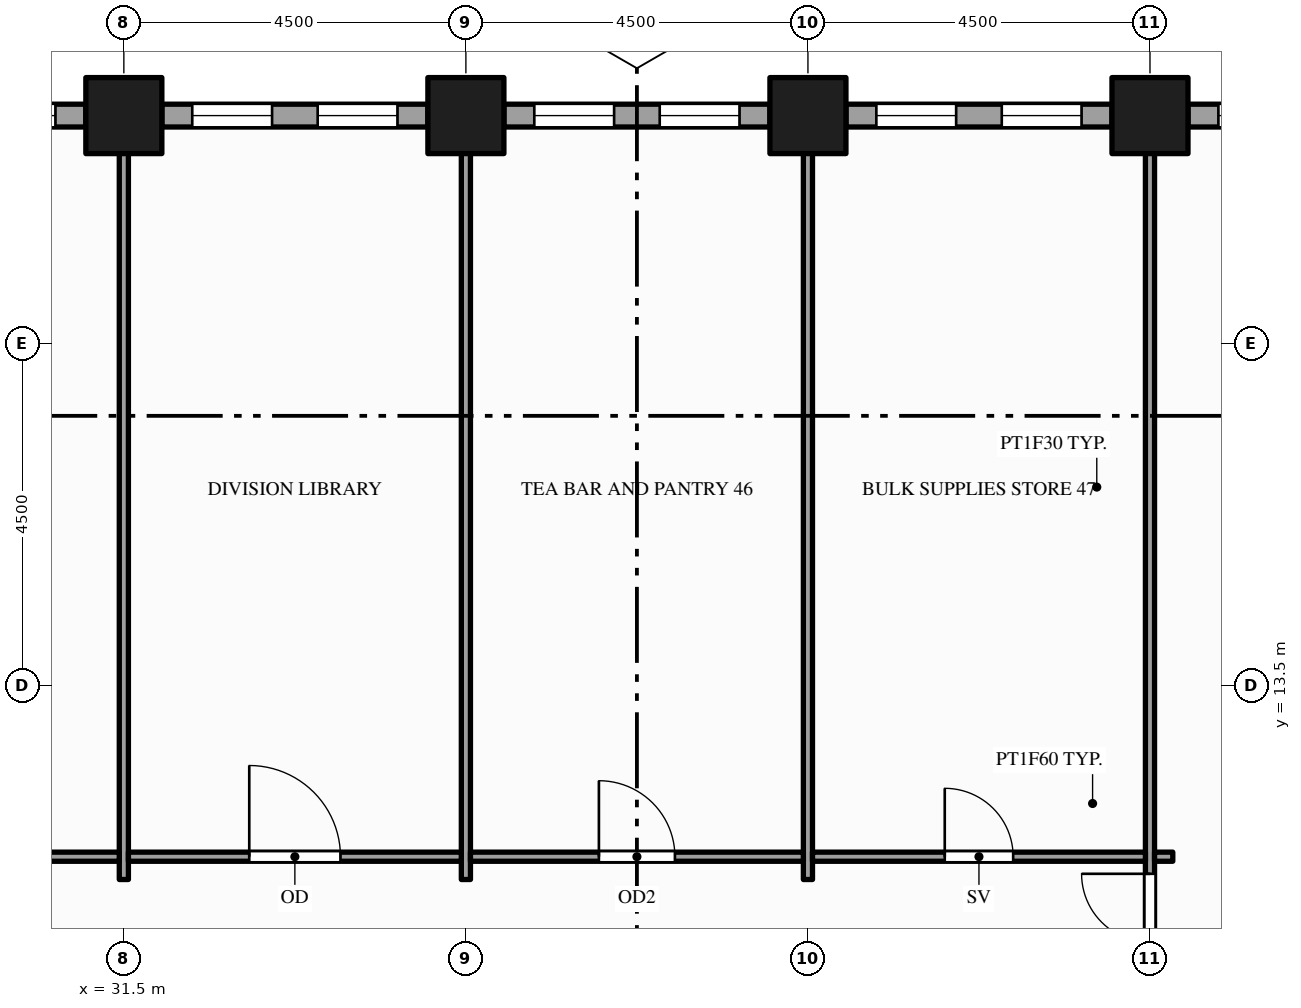
"""IFC4 building model, lengths in metres.
Left out: names, types, materials, properties, quantities, classifications, styles, units other than length and angle.
Written with IfcOpenShell. Run it as: python <this file> out.ifc"""

import sys

from ifc_helpers import new_model, si_unit, direction, frame, frame_2d, origin, origin_2d, place, context, subcontext, project, spatial, rectangle, hollow_rectangle, extrude, element, fill, save


model = new_model("IFC4")
c1 = context("Model", 3, precision=1e-05, world=origin(), true_north=direction((0.0, 1.0)))
c2 = subcontext(c1, "Body", "Model", "MODEL_VIEW")
j1 = project(units=[si_unit("LENGTHUNIT", "METRE"), si_unit("PLANEANGLEUNIT", "RADIAN")], contexts=[c1])
p1 = place(None, origin())
s1 = spatial("IfcSite", under=j1, at=p1, CompositionType="ELEMENT")
p2 = place(p1, origin())
s2 = spatial("IfcBuilding", under=s1, at=p2, CompositionType="ELEMENT")
p3 = place(p2, frame((0.0, 0.0, 119.0)))
s3 = spatial("IfcBuildingStorey", under=s2, at=p3, CompositionType="ELEMENT", Elevation=119.0)
for number, where, z_axis, x_axis in (
    (1, (31.5, 21.0, -0.15), (0.0, 0.0, 1.0), (1.0, 0.0, 0.0)),
    (2, (36.0, 21.0, -0.15), (0.0, 0.0, 1.0), (1.0, 0.0, 0.0)),
    (3, (40.5, 21.0, -0.15), (0.0, 0.0, 1.0), (1.0, 0.0, 0.0)),
    (4, (45.0, 21.0, -0.15), (0.0, 0.0, 1.0), (1.0, 0.0, 0.0)),
):
    element("IfcColumn", number, at=place(p3, frame(where, z_axis=z_axis, x_axis=x_axis)), inside=s3, PredefinedType="COLUMN", context=c2, shape_type="SweptSolid", body=[
        extrude(hollow_rectangle(XDim=1.0, YDim=1.0, WallThickness=0.05, at=origin_2d()), origin(), (0.0, 0.0, 1.0), 4.0),
    ])
p4 = place(p3, frame((49.0, 21.0, 0.0), z_axis=(0.0, 0.0, 1.0), x_axis=(-1.0, 0.0, 0.0)))
e5 = element("IfcWall", 5, at=p4, inside=s3, PredefinedType="STANDARD", context=c2, shape_type="SweptSolid", body=[
    extrude(rectangle(XDim=3.5, YDim=0.3, at=frame_2d((1.75, 0.0))), origin(), (0.0, 0.0, 1.0), 3.154),
])
p5 = place(p4, frame((0.4, 0.0, 0.9)))
e6 = element("IfcOpeningElement", 6, at=p5, cuts=e5, PredefinedType="OPENING", context=c2, shape_type="SweptSolid", body=[
    extrude(rectangle(XDim=1.05, YDim=2.0, at=frame_2d((0.525, 1.0))), frame((0.0, 0.16, 0.0), z_axis=(0.0, -1.0, 0.0), x_axis=(1.0, 0.0, 0.0)), (0.0, 0.0, 1.0), 0.32),
])
p6 = place(p4, frame((2.05, 0.0, 0.9)))
e7 = element("IfcOpeningElement", 7, at=p6, cuts=e5, PredefinedType="OPENING", context=c2, shape_type="SweptSolid", body=[
    extrude(rectangle(XDim=1.05, YDim=2.0, at=frame_2d((0.525, 1.0))), frame((0.0, 0.16, 0.0), z_axis=(0.0, -1.0, 0.0), x_axis=(1.0, 0.0, 0.0)), (0.0, 0.0, 1.0), 0.32),
])
p7 = place(p3, frame((44.5, 21.0, 0.0), z_axis=(0.0, 0.0, 1.0), x_axis=(-1.0, 0.0, 0.0)))
e8 = element("IfcWall", 8, at=p7, inside=s3, PredefinedType="STANDARD", context=c2, shape_type="SweptSolid", body=[
    extrude(rectangle(XDim=3.5, YDim=0.3, at=frame_2d((1.75, 0.0))), origin(), (0.0, 0.0, 1.0), 3.154),
])
p8 = place(p7, frame((0.4, 0.0, 0.9)))
e9 = element("IfcOpeningElement", 9, at=p8, cuts=e8, PredefinedType="OPENING", context=c2, shape_type="SweptSolid", body=[
    extrude(rectangle(XDim=1.05, YDim=2.0, at=frame_2d((0.525, 1.0))), frame((0.0, 0.16, 0.0), z_axis=(0.0, -1.0, 0.0), x_axis=(1.0, 0.0, 0.0)), (0.0, 0.0, 1.0), 0.32),
])
p9 = place(p7, frame((2.05, 0.0, 0.9)))
e10 = element("IfcOpeningElement", 10, at=p9, cuts=e8, PredefinedType="OPENING", context=c2, shape_type="SweptSolid", body=[
    extrude(rectangle(XDim=1.05, YDim=2.0, at=frame_2d((0.525, 1.0))), frame((0.0, 0.16, 0.0), z_axis=(0.0, -1.0, 0.0), x_axis=(1.0, 0.0, 0.0)), (0.0, 0.0, 1.0), 0.32),
])
p10 = place(p3, frame((40.0, 21.0, 0.0), z_axis=(0.0, 0.0, 1.0), x_axis=(-1.0, 0.0, 0.0)))
e11 = element("IfcWall", 11, at=p10, inside=s3, PredefinedType="STANDARD", context=c2, shape_type="SweptSolid", body=[
    extrude(rectangle(XDim=3.5, YDim=0.3, at=frame_2d((1.75, 0.0))), origin(), (0.0, 0.0, 1.0), 3.154),
])
p11 = place(p10, frame((0.4, 0.0, 0.9)))
e12 = element("IfcOpeningElement", 12, at=p11, cuts=e11, PredefinedType="OPENING", context=c2, shape_type="SweptSolid", body=[
    extrude(rectangle(XDim=1.05, YDim=2.0, at=frame_2d((0.525, 1.0))), frame((0.0, 0.16, 0.0), z_axis=(0.0, -1.0, 0.0), x_axis=(1.0, 0.0, 0.0)), (0.0, 0.0, 1.0), 0.32),
])
p12 = place(p10, frame((2.05, 0.0, 0.9)))
e13 = element("IfcOpeningElement", 13, at=p12, cuts=e11, PredefinedType="OPENING", context=c2, shape_type="SweptSolid", body=[
    extrude(rectangle(XDim=1.05, YDim=2.0, at=frame_2d((0.525, 1.0))), frame((0.0, 0.16, 0.0), z_axis=(0.0, -1.0, 0.0), x_axis=(1.0, 0.0, 0.0)), (0.0, 0.0, 1.0), 0.32),
])
p13 = place(p3, frame((35.5, 21.0, 0.0), z_axis=(0.0, 0.0, 1.0), x_axis=(-1.0, 0.0, 0.0)))
e14 = element("IfcWall", 14, at=p13, inside=s3, PredefinedType="STANDARD", context=c2, shape_type="SweptSolid", body=[
    extrude(rectangle(XDim=3.5, YDim=0.3, at=frame_2d((1.75, 0.0))), origin(), (0.0, 0.0, 1.0), 3.154),
])
p14 = place(p13, frame((0.4, 0.0, 0.9)))
e15 = element("IfcOpeningElement", 15, at=p14, cuts=e14, PredefinedType="OPENING", context=c2, shape_type="SweptSolid", body=[
    extrude(rectangle(XDim=1.05, YDim=2.0, at=frame_2d((0.525, 1.0))), frame((0.0, 0.16, 0.0), z_axis=(0.0, -1.0, 0.0), x_axis=(1.0, 0.0, 0.0)), (0.0, 0.0, 1.0), 0.32),
])
p15 = place(p13, frame((2.05, 0.0, 0.9)))
e16 = element("IfcOpeningElement", 16, at=p15, cuts=e14, PredefinedType="OPENING", context=c2, shape_type="SweptSolid", body=[
    extrude(rectangle(XDim=1.05, YDim=2.0, at=frame_2d((0.525, 1.0))), frame((0.0, 0.16, 0.0), z_axis=(0.0, -1.0, 0.0), x_axis=(1.0, 0.0, 0.0)), (0.0, 0.0, 1.0), 0.32),
])
p16 = place(p3, frame((31.0, 21.0, 0.0), z_axis=(0.0, 0.0, 1.0), x_axis=(-1.0, 0.0, 0.0)))
e17 = element("IfcWall", 17, at=p16, inside=s3, PredefinedType="STANDARD", context=c2, shape_type="SweptSolid", body=[
    extrude(rectangle(XDim=2.0, YDim=0.3, at=frame_2d((1.0, 0.0))), origin(), (0.0, 0.0, 1.0), 3.154),
])
p17 = place(p16, frame((0.4, 0.0, 0.9)))
e18 = element("IfcOpeningElement", 18, at=p17, cuts=e17, PredefinedType="OPENING", context=c2, shape_type="SweptSolid", body=[
    extrude(rectangle(XDim=1.2, YDim=2.0, at=frame_2d((0.6, 1.0))), frame((0.0, 0.16, 0.0), z_axis=(0.0, -1.0, 0.0), x_axis=(1.0, 0.0, 0.0)), (0.0, 0.0, 1.0), 0.32),
])
for number, where, z_axis, x_axis in (
    (19, (31.5, 10.95, 0.0), (0.0, 0.0, 1.0), (0.0, 1.0, 0.0)),
    (20, (36.0, 10.95, 0.0), (0.0, 0.0, 1.0), (0.0, 1.0, 0.0)),
    (21, (40.5, 10.95, 0.0), (0.0, 0.0, 1.0), (0.0, 1.0, 0.0)),
):
    element("IfcWall", number, at=place(p3, frame(where, z_axis=z_axis, x_axis=x_axis)), inside=s3, PredefinedType="PARTITIONING", context=c2, shape_type="SweptSolid", body=[
        extrude(rectangle(XDim=9.9, YDim=0.12, at=frame_2d((4.95, 0.0))), origin(), (0.0, 0.0, 1.0), 2.938),
    ])
p18 = place(p3, frame((45.0, -1.35, 0.0), z_axis=(0.0, 0.0, 1.0), x_axis=(0.0, 1.0, 0.0)))
e22 = element("IfcWall", 22, at=p18, inside=s3, PredefinedType="PARTITIONING", context=c2, shape_type="SweptSolid", body=[
    extrude(rectangle(XDim=22.2, YDim=0.12, at=frame_2d((11.1, 0.0))), origin(), (0.0, 0.0, 1.0), 2.938),
])
p19 = place(p18, frame((10.575, 0.0, 0.0)))
e23 = element("IfcOpeningElement", 23, at=p19, cuts=e22, PredefinedType="OPENING", context=c2, shape_type="SweptSolid", body=[
    extrude(rectangle(XDim=1.8, YDim=2.1, at=frame_2d((0.9, 1.05))), frame((0.0, 0.07, 0.0), z_axis=(0.0, -1.0, 0.0), x_axis=(1.0, 0.0, 0.0)), (0.0, 0.0, 1.0), 0.14),
])
p20 = place(p18, frame((0.85, 0.0, 0.0)))
e24 = element("IfcOpeningElement", 24, at=p20, cuts=e22, PredefinedType="OPENING", context=c2, shape_type="SweptSolid", body=[
    extrude(rectangle(XDim=0.9, YDim=2.1, at=frame_2d((0.45, 1.05))), frame((0.0, 0.07, 0.0), z_axis=(0.0, -1.0, 0.0), x_axis=(1.0, 0.0, 0.0)), (0.0, 0.0, 1.0), 0.14),
])
p21 = place(p18, frame((4.65, 0.0, 0.0)))
e25 = element("IfcOpeningElement", 25, at=p21, cuts=e22, PredefinedType="OPENING", context=c2, shape_type="SweptSolid", body=[
    extrude(rectangle(XDim=0.9, YDim=2.1, at=frame_2d((0.45, 1.05))), frame((0.0, 0.07, 0.0), z_axis=(0.0, -1.0, 0.0), x_axis=(1.0, 0.0, 0.0)), (0.0, 0.0, 1.0), 0.14),
])
p22 = place(p18, frame((8.35, 0.0, 0.0)))
e26 = element("IfcOpeningElement", 26, at=p22, cuts=e22, PredefinedType="OPENING", context=c2, shape_type="SweptSolid", body=[
    extrude(rectangle(XDim=1.0, YDim=2.1, at=frame_2d((0.5, 1.05))), frame((0.0, 0.07, 0.0), z_axis=(0.0, -1.0, 0.0), x_axis=(1.0, 0.0, 0.0)), (0.0, 0.0, 1.0), 0.14),
])
p23 = place(p3, frame((15.81, 11.25, 0.0), z_axis=(0.0, 0.0, 1.0), x_axis=(1.0, 0.0, 0.0)))
e27 = element("IfcWall", 27, at=p23, inside=s3, PredefinedType="PARTITIONING", context=c2, shape_type="SweptSolid", body=[
    extrude(rectangle(XDim=15.63, YDim=0.12, at=frame_2d((7.815, 0.0))), origin(), (0.0, 0.0, 1.0), 2.76),
])
p24 = place(p23, frame((3.54, 0.0, 0.0)))
e28 = element("IfcOpeningElement", 28, at=p24, cuts=e27, PredefinedType="OPENING", context=c2, shape_type="SweptSolid", body=[
    extrude(rectangle(XDim=1.8, YDim=2.1, at=frame_2d((0.9, 1.05))), frame((0.0, 0.07, 0.0), z_axis=(0.0, -1.0, 0.0), x_axis=(1.0, 0.0, 0.0)), (0.0, 0.0, 1.0), 0.14),
])
p25 = place(p3, frame((31.56, 11.25, 0.0), z_axis=(0.0, 0.0, 1.0), x_axis=(1.0, 0.0, 0.0)))
e29 = element("IfcWall", 29, at=p25, inside=s3, PredefinedType="PARTITIONING", context=c2, shape_type="SweptSolid", body=[
    extrude(rectangle(XDim=4.38, YDim=0.12, at=frame_2d((2.19, 0.0))), origin(), (0.0, 0.0, 1.0), 2.938),
])
p26 = place(p25, frame((1.59, 0.0, 0.0)))
e30 = element("IfcOpeningElement", 30, at=p26, cuts=e29, PredefinedType="OPENING", context=c2, shape_type="SweptSolid", body=[
    extrude(rectangle(XDim=1.2, YDim=2.1, at=frame_2d((0.6, 1.05))), frame((0.0, 0.07, 0.0), z_axis=(0.0, -1.0, 0.0), x_axis=(1.0, 0.0, 0.0)), (0.0, 0.0, 1.0), 0.14),
])
p27 = place(p3, frame((36.06, 11.25, 0.0), z_axis=(0.0, 0.0, 1.0), x_axis=(1.0, 0.0, 0.0)))
e31 = element("IfcWall", 31, at=p27, inside=s3, PredefinedType="PARTITIONING", context=c2, shape_type="SweptSolid", body=[
    extrude(rectangle(XDim=4.38, YDim=0.12, at=frame_2d((2.19, 0.0))), origin(), (0.0, 0.0, 1.0), 2.938),
])
p28 = place(p27, frame((1.69, 0.0, 0.0)))
e32 = element("IfcOpeningElement", 32, at=p28, cuts=e31, PredefinedType="OPENING", context=c2, shape_type="SweptSolid", body=[
    extrude(rectangle(XDim=1.0, YDim=2.1, at=frame_2d((0.5, 1.05))), frame((0.0, 0.07, 0.0), z_axis=(0.0, -1.0, 0.0), x_axis=(1.0, 0.0, 0.0)), (0.0, 0.0, 1.0), 0.14),
])
p29 = place(p3, frame((40.56, 11.25, 0.0), z_axis=(0.0, 0.0, 1.0), x_axis=(1.0, 0.0, 0.0)))
e33 = element("IfcWall", 33, at=p29, inside=s3, PredefinedType="PARTITIONING", context=c2, shape_type="SweptSolid", body=[
    extrude(rectangle(XDim=4.38, YDim=0.12, at=frame_2d((2.19, 0.0))), origin(), (0.0, 0.0, 1.0), 2.938),
])
p30 = place(p29, frame((1.74, 0.0, 0.0)))
e34 = element("IfcOpeningElement", 34, at=p30, cuts=e33, PredefinedType="OPENING", context=c2, shape_type="SweptSolid", body=[
    extrude(rectangle(XDim=0.9, YDim=2.1, at=frame_2d((0.45, 1.05))), frame((0.0, 0.07, 0.0), z_axis=(0.0, -1.0, 0.0), x_axis=(1.0, 0.0, 0.0)), (0.0, 0.0, 1.0), 0.14),
])
p31 = place(p3, frame((45.06, 11.25, 0.0), z_axis=(0.0, 0.0, 1.0), x_axis=(1.0, 0.0, 0.0)))
e35 = element("IfcWall", 35, at=p31, inside=s3, PredefinedType="PARTITIONING", context=c2, shape_type="SweptSolid", body=[
    extrude(rectangle(XDim=0.24, YDim=0.12, at=frame_2d((0.12, 0.0))), origin(), (0.0, 0.0, 1.0), 2.938),
])
p32 = place(p6, origin())
e36 = element("IfcWindow", 36, at=p32, inside=s3, PartitioningType="SINGLE_PANEL", PredefinedType="WINDOW", context=c2, shape_type="SweptSolid", body=[
    extrude(rectangle(XDim=1.05, YDim=2.0, at=frame_2d((0.525, 1.0))), frame((0.0, 0.03, 0.0), z_axis=(0.0, -1.0, 0.0), x_axis=(1.0, 0.0, 0.0)), (0.0, 0.0, 1.0), 0.06),
])
fill(e7, e36)
p33 = place(p8, origin())
e37 = element("IfcWindow", 37, at=p33, inside=s3, PartitioningType="SINGLE_PANEL", PredefinedType="WINDOW", context=c2, shape_type="SweptSolid", body=[
    extrude(rectangle(XDim=1.05, YDim=2.0, at=frame_2d((0.525, 1.0))), frame((0.0, 0.03, 0.0), z_axis=(0.0, -1.0, 0.0), x_axis=(1.0, 0.0, 0.0)), (0.0, 0.0, 1.0), 0.06),
])
fill(e9, e37)
p34 = place(p9, origin())
e38 = element("IfcWindow", 38, at=p34, inside=s3, PartitioningType="SINGLE_PANEL", PredefinedType="WINDOW", context=c2, shape_type="SweptSolid", body=[
    extrude(rectangle(XDim=1.05, YDim=2.0, at=frame_2d((0.525, 1.0))), frame((0.0, 0.03, 0.0), z_axis=(0.0, -1.0, 0.0), x_axis=(1.0, 0.0, 0.0)), (0.0, 0.0, 1.0), 0.06),
])
fill(e10, e38)
p35 = place(p11, origin())
e39 = element("IfcWindow", 39, at=p35, inside=s3, PartitioningType="SINGLE_PANEL", PredefinedType="WINDOW", context=c2, shape_type="SweptSolid", body=[
    extrude(rectangle(XDim=1.05, YDim=2.0, at=frame_2d((0.525, 1.0))), frame((0.0, 0.03, 0.0), z_axis=(0.0, -1.0, 0.0), x_axis=(1.0, 0.0, 0.0)), (0.0, 0.0, 1.0), 0.06),
])
fill(e12, e39)
p36 = place(p12, origin())
e40 = element("IfcWindow", 40, at=p36, inside=s3, PartitioningType="SINGLE_PANEL", PredefinedType="WINDOW", context=c2, shape_type="SweptSolid", body=[
    extrude(rectangle(XDim=1.05, YDim=2.0, at=frame_2d((0.525, 1.0))), frame((0.0, 0.03, 0.0), z_axis=(0.0, -1.0, 0.0), x_axis=(1.0, 0.0, 0.0)), (0.0, 0.0, 1.0), 0.06),
])
fill(e13, e40)
p37 = place(p14, origin())
e41 = element("IfcWindow", 41, at=p37, inside=s3, PartitioningType="SINGLE_PANEL", PredefinedType="WINDOW", context=c2, shape_type="SweptSolid", body=[
    extrude(rectangle(XDim=1.05, YDim=2.0, at=frame_2d((0.525, 1.0))), frame((0.0, 0.03, 0.0), z_axis=(0.0, -1.0, 0.0), x_axis=(1.0, 0.0, 0.0)), (0.0, 0.0, 1.0), 0.06),
])
fill(e15, e41)
p38 = place(p15, origin())
e42 = element("IfcWindow", 42, at=p38, inside=s3, PartitioningType="SINGLE_PANEL", PredefinedType="WINDOW", context=c2, shape_type="SweptSolid", body=[
    extrude(rectangle(XDim=1.05, YDim=2.0, at=frame_2d((0.525, 1.0))), frame((0.0, 0.03, 0.0), z_axis=(0.0, -1.0, 0.0), x_axis=(1.0, 0.0, 0.0)), (0.0, 0.0, 1.0), 0.06),
])
fill(e16, e42)
p39 = place(p17, origin())
e43 = element("IfcWindow", 43, at=p39, inside=s3, PartitioningType="SINGLE_PANEL", PredefinedType="WINDOW", context=c2, shape_type="SweptSolid", body=[
    extrude(rectangle(XDim=1.2, YDim=2.0, at=frame_2d((0.6, 1.0))), frame((0.0, 0.03, 0.0), z_axis=(0.0, -1.0, 0.0), x_axis=(1.0, 0.0, 0.0)), (0.0, 0.0, 1.0), 0.06),
])
fill(e18, e43)
p40 = place(p19, origin())
e44 = element("IfcDoor", 44, at=p40, inside=s3, OperationType="DOUBLE_DOOR_SINGLE_SWING", PredefinedType="DOOR", context=c2, shape_type="SweptSolid", body=[
    extrude(rectangle(XDim=1.8, YDim=2.1, at=frame_2d((0.9, 1.05))), frame((0.0, 0.025, 0.0), z_axis=(0.0, -1.0, 0.0), x_axis=(1.0, 0.0, 0.0)), (0.0, 0.0, 1.0), 0.05),
])
fill(e23, e44)
p41 = place(p26, origin())
e45 = element("IfcDoor", 45, at=p41, inside=s3, OperationType="SINGLE_SWING_LEFT", PredefinedType="DOOR", context=c2, shape_type="SweptSolid", body=[
    extrude(rectangle(XDim=1.2, YDim=2.1, at=frame_2d((0.6, 1.05))), frame((0.0, 0.025, 0.0), z_axis=(0.0, -1.0, 0.0), x_axis=(1.0, 0.0, 0.0)), (0.0, 0.0, 1.0), 0.05),
])
fill(e30, e45)
p42 = place(p28, origin())
e46 = element("IfcDoor", 46, at=p42, inside=s3, OperationType="SINGLE_SWING_LEFT", PredefinedType="DOOR", context=c2, shape_type="SweptSolid", body=[
    extrude(rectangle(XDim=1.0, YDim=2.1, at=frame_2d((0.5, 1.05))), frame((0.0, 0.025, 0.0), z_axis=(0.0, -1.0, 0.0), x_axis=(1.0, 0.0, 0.0)), (0.0, 0.0, 1.0), 0.05),
])
fill(e32, e46)
p43 = place(p30, origin())
e47 = element("IfcDoor", 47, at=p43, inside=s3, OperationType="SINGLE_SWING_LEFT", PredefinedType="DOOR", context=c2, shape_type="SweptSolid", body=[
    extrude(rectangle(XDim=0.9, YDim=2.1, at=frame_2d((0.45, 1.05))), frame((0.0, 0.025, 0.0), z_axis=(0.0, -1.0, 0.0), x_axis=(1.0, 0.0, 0.0)), (0.0, 0.0, 1.0), 0.05),
])
fill(e34, e47)
save(model, sys.argv[1])
